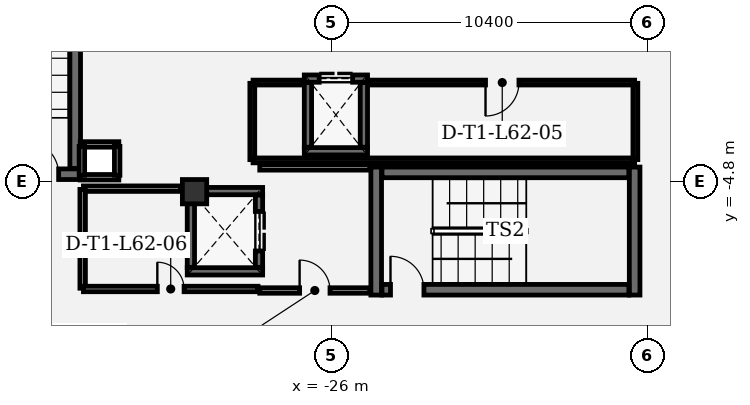
"""IFC4 building model, lengths in metres.
Left out: names, types, materials, properties, quantities, classifications, styles, units other than length and angle.
Written with IfcOpenShell. Run it as: python <this file> out.ifc"""

import sys

from ifc_helpers import new_model, si_unit, direction, frame, frame_2d, origin, origin_2d, place, context, subcontext, project, spatial, rectangle, extrude, element, fill, save


model = new_model("IFC4")
c1 = context("Model", 3, precision=1e-05, world=origin(), true_north=direction((0.0, 1.0)))
c2 = subcontext(c1, "Body", "Model", "MODEL_VIEW")
j1 = project(units=[si_unit("LENGTHUNIT", "METRE"), si_unit("PLANEANGLEUNIT", "RADIAN")], contexts=[c1])
p1 = place(None, origin())
s1 = spatial("IfcSite", under=j1, at=p1, CompositionType="ELEMENT")
p2 = place(p1, origin())
s2 = spatial("IfcBuilding", under=s1, at=p2, CompositionType="ELEMENT")
p3 = place(p2, frame((0.0, 0.0, 268.2)))
s3 = spatial("IfcBuildingStorey", under=s2, at=p3, CompositionType="ELEMENT", Elevation=268.2)
p4 = place(p3, frame((-30.5, -5.15, 0.0), z_axis=(0.0, 0.0, 1.0), x_axis=(1.0, 0.0, 0.0)))
e1 = element("IfcColumn", 1, at=p4, inside=s3, PredefinedType="COLUMN", context=c2, shape_type="SweptSolid", body=[
    extrude(rectangle(XDim=0.8, YDim=0.8, at=origin_2d()), origin(), (0.0, 0.0, 1.0), 4.2),
])
for number, where, z_axis, x_axis in (
    (2, (-24.525, -4.34, 0.0), (0.0, 0.0, 1.0), (0.0, -1.0, 0.0)),
    (3, (-16.025, -8.55, 0.0), (0.0, 0.0, 1.0), (0.0, 1.0, 0.0)),
):
    element("IfcWall", number, at=place(p3, frame(where, z_axis=z_axis, x_axis=x_axis)), inside=s3, PredefinedType="SHEAR", context=c2, shape_type="SweptSolid", body=[
        extrude(rectangle(XDim=4.21, YDim=0.35, at=frame_2d((2.105, 0.0))), origin(), (0.0, 0.0, 1.0), 3.91),
    ])
p5 = place(p3, frame((-24.335, -8.375, 0.0), z_axis=(0.0, 0.0, 1.0), x_axis=(1.0, 0.0, 0.0)))
e4 = element("IfcWall", 4, at=p5, inside=s3, PredefinedType="SHEAR", context=c2, shape_type="SweptSolid", body=[
    extrude(rectangle(XDim=8.12, YDim=0.35, at=frame_2d((4.06, 0.0))), origin(), (0.0, 0.0, 1.0), 3.91),
])
p6 = place(p5, frame((0.28, 0.0, 0.0)))
e5 = element("IfcOpeningElement", 5, at=p6, cuts=e4, PredefinedType="OPENING", context=c2, shape_type="SweptSolid", body=[
    extrude(rectangle(XDim=1.1, YDim=2.2, at=frame_2d((0.55, 1.1))), frame((0.0, 0.185, 0.0), z_axis=(0.0, -1.0, 0.0), x_axis=(1.0, 0.0, 0.0)), (0.0, 0.0, 1.0), 0.37),
])
p7 = place(p3, frame((-16.215, -4.515, 0.0), z_axis=(0.0, 0.0, 1.0), x_axis=(-1.0, 0.0, 0.0)))
e6 = element("IfcWall", 6, at=p7, inside=s3, PredefinedType="SHEAR", context=c2, shape_type="SweptSolid", body=[
    extrude(rectangle(XDim=8.12, YDim=0.35, at=frame_2d((4.06, 0.0))), origin(), (0.0, 0.0, 1.0), 3.91),
])
p8 = place(p3, frame((-38.46, -4.575, 0.0), z_axis=(0.0, 0.0, 1.0), x_axis=(1.0, 0.0, 0.0)))
e7 = element("IfcWall", 7, at=p8, inside=s3, PredefinedType="SHEAR", context=c2, shape_type="SweptSolid", body=[
    extrude(rectangle(XDim=4.21, YDim=0.35, at=frame_2d((2.105, 0.0))), origin(), (0.0, 0.0, 1.0), 3.91),
])
p9 = place(p8, frame((2.39, 0.0, 0.0)))
e8 = element("IfcOpeningElement", 8, at=p9, cuts=e7, PredefinedType="OPENING", context=c2, shape_type="SweptSolid", body=[
    extrude(rectangle(XDim=1.1, YDim=2.2, at=frame_2d((0.55, 1.1))), frame((0.0, 0.185, 0.0), z_axis=(0.0, -1.0, 0.0), x_axis=(1.0, 0.0, 0.0)), (0.0, 0.0, 1.0), 0.37),
])
p10 = place(p3, frame((-34.425, -4.385, 0.0), z_axis=(0.0, 0.0, 1.0), x_axis=(0.0, 1.0, 0.0)))
e9 = element("IfcWall", 9, at=p10, inside=s3, PredefinedType="SHEAR", context=c2, shape_type="SweptSolid", body=[
    extrude(rectangle(XDim=8.77, YDim=0.35, at=frame_2d((4.385, 0.0))), origin(), (0.0, 0.0, 1.0), 3.91),
])
for number, where, z_axis, x_axis in (
    (10, (-28.26, -7.77, 0.0), (0.0, 0.0, 1.0), (-1.0, 0.0, 0.0)),
    (11, (-30.74, -5.13, 0.0), (0.0, 0.0, 1.0), (1.0, 0.0, 0.0)),
):
    element("IfcWall", number, at=place(p3, frame(where, z_axis=z_axis, x_axis=x_axis)), inside=s3, PredefinedType="SHEAR", context=c2, shape_type="SweptSolid", body=[
        extrude(rectangle(XDim=2.48, YDim=0.24, at=frame_2d((1.24, 0.0))), origin(), (0.0, 0.0, 1.0), 3.91),
    ])
p11 = place(p3, frame((-30.62, -7.638, 0.0), z_axis=(0.0, 0.0, 1.0), x_axis=(0.0, 1.0, 0.0)))
e12 = element("IfcWall", 12, at=p11, inside=s3, PredefinedType="SHEAR", context=c2, shape_type="SweptSolid", body=[
    extrude(rectangle(XDim=2.376, YDim=0.24, at=frame_2d((1.188, 0.0))), origin(), (0.0, 0.0, 1.0), 3.91),
])
p12 = place(p3, frame((-28.38, -5.262, 0.0), z_axis=(0.0, 0.0, 1.0), x_axis=(0.0, -1.0, 0.0)))
e13 = element("IfcWall", 13, at=p12, inside=s3, PredefinedType="SHEAR", context=c2, shape_type="SweptSolid", body=[
    extrude(rectangle(XDim=2.376, YDim=0.24, at=frame_2d((1.188, 0.0))), origin(), (0.0, 0.0, 1.0), 3.91),
])
p13 = place(p12, frame((0.538, 0.0, 0.0)))
e14 = element("IfcOpeningElement", 14, at=p13, cuts=e13, PredefinedType="OPENING", context=c2, shape_type="SweptSolid", body=[
    extrude(rectangle(XDim=1.3, YDim=2.3, at=frame_2d((0.65, 1.15))), frame((0.0, 0.13, 0.0), z_axis=(0.0, -1.0, 0.0), x_axis=(1.0, 0.0, 0.0)), (0.0, 0.0, 1.0), 0.26),
])
p14 = place(p3, frame((-24.81, -3.82, 0.0), z_axis=(0.0, 0.0, 1.0), x_axis=(-1.0, 0.0, 0.0)))
e15 = element("IfcWall", 15, at=p14, inside=s3, PredefinedType="SHEAR", context=c2, shape_type="SweptSolid", body=[
    extrude(rectangle(XDim=2.08, YDim=0.24, at=frame_2d((1.04, 0.0))), origin(), (0.0, 0.0, 1.0), 3.91),
])
p15 = place(p3, frame((-26.89, -1.43, 0.0), z_axis=(0.0, 0.0, 1.0), x_axis=(1.0, 0.0, 0.0)))
e16 = element("IfcWall", 16, at=p15, inside=s3, PredefinedType="SHEAR", context=c2, shape_type="SweptSolid", body=[
    extrude(rectangle(XDim=2.08, YDim=0.24, at=frame_2d((1.04, 0.0))), origin(), (0.0, 0.0, 1.0), 3.91),
])
p16 = place(p15, frame((0.49, 0.0, 0.0)))
e17 = element("IfcOpeningElement", 17, at=p16, cuts=e16, PredefinedType="OPENING", context=c2, shape_type="SweptSolid", body=[
    extrude(rectangle(XDim=1.1, YDim=2.2, at=frame_2d((0.55, 1.1))), frame((0.0, 0.13, 0.0), z_axis=(0.0, -1.0, 0.0), x_axis=(1.0, 0.0, 0.0)), (0.0, 0.0, 1.0), 0.26),
])
for number, where, z_axis, x_axis in (
    (18, (-26.77, -3.688, 0.0), (0.0, 0.0, 1.0), (0.0, 1.0, 0.0)),
    (19, (-24.93, -1.562, 0.0), (0.0, 0.0, 1.0), (0.0, -1.0, 0.0)),
):
    element("IfcWall", number, at=place(p3, frame(where, z_axis=z_axis, x_axis=x_axis)), inside=s3, PredefinedType="SHEAR", context=c2, shape_type="SweptSolid", body=[
        extrude(rectangle(XDim=2.126, YDim=0.24, at=frame_2d((1.063, 0.0))), origin(), (0.0, 0.0, 1.0), 3.91),
    ])
for number, where, z_axis, x_axis in (
    (20, (-32.99, -4.675, 0.0), (0.0, 0.0, 1.0), (-1.0, 0.0, 0.0)),
    (21, (-34.26, -3.595, 0.0), (0.0, 0.0, 1.0), (1.0, 0.0, 0.0)),
):
    element("IfcWall", number, at=place(p3, frame(where, z_axis=z_axis, x_axis=x_axis)), inside=s3, PredefinedType="PARTITIONING", context=c2, shape_type="SweptSolid", body=[
        extrude(rectangle(XDim=1.27, YDim=0.18, at=frame_2d((0.635, 0.0))), origin(), (0.0, 0.0, 1.0), 3.91),
    ])
for number, where, z_axis, x_axis in (
    (22, (-34.205, -4.61, 0.0), (0.0, 0.0, 1.0), (0.0, 1.0, 0.0)),
    (23, (-33.045, -3.66, 0.0), (0.0, 0.0, 1.0), (0.0, -1.0, 0.0)),
):
    element("IfcWall", number, at=place(p3, frame(where, z_axis=z_axis, x_axis=x_axis)), inside=s3, PredefinedType="PARTITIONING", context=c2, shape_type="SweptSolid", body=[
        extrude(rectangle(XDim=0.95, YDim=0.18, at=frame_2d((0.475, 0.0))), origin(), (0.0, 0.0, 1.0), 3.91),
    ])
p17 = place(p3, frame((-28.355, -8.4, 0.0), z_axis=(0.0, 0.0, 1.0), x_axis=(1.0, 0.0, 0.0)))
e24 = element("IfcWall", 24, at=p17, inside=s3, PredefinedType="PARTITIONING", context=c2, shape_type="SweptSolid", body=[
    extrude(rectangle(XDim=3.622, YDim=0.18, at=frame_2d((1.811, 0.0))), origin(), (0.0, 0.0, 1.0), 3.529),
])
p18 = place(p17, frame((1.311, 0.0, 0.0)))
e25 = element("IfcOpeningElement", 25, at=p18, cuts=e24, PredefinedType="OPENING", context=c2, shape_type="SweptSolid", body=[
    extrude(rectangle(XDim=1.0, YDim=2.15, at=frame_2d((0.5, 1.075))), frame((0.0, 0.1, 0.0), z_axis=(0.0, -1.0, 0.0), x_axis=(1.0, 0.0, 0.0)), (0.0, 0.0, 1.0), 0.2),
])
p19 = place(p3, frame((-24.733, -4.35, 0.0), z_axis=(0.0, 0.0, 1.0), x_axis=(-1.0, 0.0, 0.0)))
e26 = element("IfcWall", 26, at=p19, inside=s3, PredefinedType="PARTITIONING", context=c2, shape_type="SweptSolid", body=[
    extrude(rectangle(XDim=3.622, YDim=0.18, at=frame_2d((1.811, 0.0))), origin(), (0.0, 0.0, 1.0), 3.91),
])
p20 = place(p3, frame((-28.6, -1.585, 0.0), z_axis=(0.0, 0.0, 1.0), x_axis=(0.0, -1.0, 0.0)))
e27 = element("IfcWall", 27, at=p20, inside=s3, PredefinedType="PARTITIONING", context=c2, shape_type="SweptSolid", body=[
    extrude(rectangle(XDim=2.51, YDim=0.16, at=frame_2d((1.255, 0.0))), origin(), (0.0, 0.0, 1.0), 3.91),
])
p21 = place(p3, frame((-28.575, -4.12, 0.0), z_axis=(0.0, 0.0, 1.0), x_axis=(1.0, 0.0, 0.0)))
e28 = element("IfcWall", 28, at=p21, inside=s3, PredefinedType="PARTITIONING", context=c2, shape_type="SweptSolid", body=[
    extrude(rectangle(XDim=12.55, YDim=0.16, at=frame_2d((6.275, 0.0))), origin(), (0.0, 0.0, 1.0), 3.91),
])
p22 = place(p3, frame((-16.0, -4.095, 0.0), z_axis=(0.0, 0.0, 1.0), x_axis=(0.0, 1.0, 0.0)))
e29 = element("IfcWall", 29, at=p22, inside=s3, PredefinedType="PARTITIONING", context=c2, shape_type="SweptSolid", body=[
    extrude(rectangle(XDim=2.51, YDim=0.16, at=frame_2d((1.255, 0.0))), origin(), (0.0, 0.0, 1.0), 3.91),
])
p23 = place(p3, frame((-16.025, -1.56, 0.0), z_axis=(0.0, 0.0, 1.0), x_axis=(-1.0, 0.0, 0.0)))
e30 = element("IfcWall", 30, at=p23, inside=s3, PredefinedType="PARTITIONING", context=c2, shape_type="SweptSolid", body=[
    extrude(rectangle(XDim=8.709, YDim=0.16, at=frame_2d((4.354, 0.0))), origin(), (0.0, 0.0, 1.0), 3.91),
])
p24 = place(p23, frame((3.804, 0.0, 0.0)))
e31 = element("IfcOpeningElement", 31, at=p24, cuts=e30, PredefinedType="OPENING", context=c2, shape_type="SweptSolid", body=[
    extrude(rectangle(XDim=1.1, YDim=2.15, at=frame_2d((0.55, 1.075))), frame((0.0, 0.09, 0.0), z_axis=(0.0, -1.0, 0.0), x_axis=(1.0, 0.0, 0.0)), (0.0, 0.0, 1.0), 0.18),
])
p25 = place(p3, frame((-26.966, -1.56, 0.0), z_axis=(0.0, 0.0, 1.0), x_axis=(-1.0, 0.0, 0.0)))
e32 = element("IfcWall", 32, at=p25, inside=s3, PredefinedType="PARTITIONING", context=c2, shape_type="SweptSolid", body=[
    extrude(rectangle(XDim=1.609, YDim=0.16, at=frame_2d((0.805, 0.0))), origin(), (0.0, 0.0, 1.0), 3.91),
])
p26 = place(p3, frame((-30.965, -5.05, 0.0), z_axis=(0.0, 0.0, 1.0), x_axis=(-1.0, 0.0, 0.0)))
e33 = element("IfcWall", 33, at=p26, inside=s3, PredefinedType="PARTITIONING", context=c2, shape_type="SweptSolid", body=[
    extrude(rectangle(XDim=3.19, YDim=0.18, at=frame_2d((1.595, 0.0))), origin(), (0.0, 0.0, 1.0), 3.91),
])
p27 = place(p3, frame((-34.18, -5.075, 0.0), z_axis=(0.0, 0.0, 1.0), x_axis=(0.0, -1.0, 0.0)))
e34 = element("IfcWall", 34, at=p27, inside=s3, PredefinedType="PARTITIONING", context=c2, shape_type="SweptSolid", body=[
    extrude(rectangle(XDim=3.25, YDim=0.18, at=frame_2d((1.625, 0.0))), origin(), (0.0, 0.0, 1.0), 3.91),
])
p28 = place(p3, frame((-34.155, -8.35, 0.0), z_axis=(0.0, 0.0, 1.0), x_axis=(1.0, 0.0, 0.0)))
e35 = element("IfcWall", 35, at=p28, inside=s3, PredefinedType="PARTITIONING", context=c2, shape_type="SweptSolid", body=[
    extrude(rectangle(XDim=5.742, YDim=0.18, at=frame_2d((2.871, 0.0))), origin(), (0.0, 0.0, 1.0), 3.529),
])
p29 = place(p28, frame((2.431, 0.0, 0.0)))
e36 = element("IfcOpeningElement", 36, at=p29, cuts=e35, PredefinedType="OPENING", context=c2, shape_type="SweptSolid", body=[
    extrude(rectangle(XDim=0.88, YDim=2.1, at=frame_2d((0.44, 1.05))), frame((0.0, 0.1, 0.0), z_axis=(0.0, -1.0, 0.0), x_axis=(1.0, 0.0, 0.0)), (0.0, 0.0, 1.0), 0.2),
])
p30 = place(p6, origin())
e37 = element("IfcDoor", 37, at=p30, inside=s3, OperationType="SINGLE_SWING_LEFT", PredefinedType="DOOR", context=c2, shape_type="SweptSolid", body=[
    extrude(rectangle(XDim=1.1, YDim=2.2, at=frame_2d((0.55, 1.1))), frame((0.0, 0.025, 0.0), z_axis=(0.0, -1.0, 0.0), x_axis=(1.0, 0.0, 0.0)), (0.0, 0.0, 1.0), 0.05),
])
fill(e5, e37)
p31 = place(p9, origin())
e38 = element("IfcDoor", 38, at=p31, inside=s3, OperationType="SINGLE_SWING_LEFT", PredefinedType="DOOR", context=c2, shape_type="SweptSolid", body=[
    extrude(rectangle(XDim=1.1, YDim=2.2, at=frame_2d((0.55, 1.1))), frame((0.0, 0.025, 0.0), z_axis=(0.0, -1.0, 0.0), x_axis=(1.0, 0.0, 0.0)), (0.0, 0.0, 1.0), 0.05),
])
fill(e8, e38)
p32 = place(p13, origin())
e39 = element("IfcDoor", 39, at=p32, inside=s3, OperationType="DOUBLE_DOOR_SLIDING", PredefinedType="DOOR", context=c2, shape_type="SweptSolid", body=[
    extrude(rectangle(XDim=1.3, YDim=2.3, at=frame_2d((0.65, 1.15))), frame((0.0, 0.025, 0.0), z_axis=(0.0, -1.0, 0.0), x_axis=(1.0, 0.0, 0.0)), (0.0, 0.0, 1.0), 0.05),
])
fill(e14, e39)
p33 = place(p16, origin())
e40 = element("IfcDoor", 40, at=p33, inside=s3, OperationType="DOUBLE_DOOR_SLIDING", PredefinedType="DOOR", context=c2, shape_type="SweptSolid", body=[
    extrude(rectangle(XDim=1.1, YDim=2.2, at=frame_2d((0.55, 1.1))), frame((0.0, 0.025, 0.0), z_axis=(0.0, -1.0, 0.0), x_axis=(1.0, 0.0, 0.0)), (0.0, 0.0, 1.0), 0.05),
])
fill(e17, e40)
p34 = place(p18, origin())
e41 = element("IfcDoor", 41, at=p34, inside=s3, OperationType="SINGLE_SWING_LEFT", PredefinedType="DOOR", context=c2, shape_type="SweptSolid", body=[
    extrude(rectangle(XDim=1.0, YDim=2.15, at=frame_2d((0.5, 1.075))), frame((0.0, 0.025, 0.0), z_axis=(0.0, -1.0, 0.0), x_axis=(1.0, 0.0, 0.0)), (0.0, 0.0, 1.0), 0.05),
])
fill(e25, e41)
p35 = place(p24, origin())
e42 = element("IfcDoor", 42, at=p35, inside=s3, OperationType="SINGLE_SWING_RIGHT", PredefinedType="DOOR", context=c2, shape_type="SweptSolid", body=[
    extrude(rectangle(XDim=1.1, YDim=2.15, at=frame_2d((0.55, 1.075))), frame((0.0, 0.025, 0.0), z_axis=(0.0, -1.0, 0.0), x_axis=(1.0, 0.0, 0.0)), (0.0, 0.0, 1.0), 0.05),
])
fill(e31, e42)
p36 = place(p29, origin())
e43 = element("IfcDoor", 43, at=p36, inside=s3, OperationType="SINGLE_SWING_LEFT", PredefinedType="DOOR", context=c2, shape_type="SweptSolid", body=[
    extrude(rectangle(XDim=0.88, YDim=2.1, at=frame_2d((0.44, 1.05))), frame((0.0, 0.025, 0.0), z_axis=(0.0, -1.0, 0.0), x_axis=(1.0, 0.0, 0.0)), (0.0, 0.0, 1.0), 0.05),
])
fill(e36, e43)
save(model, sys.argv[1])
